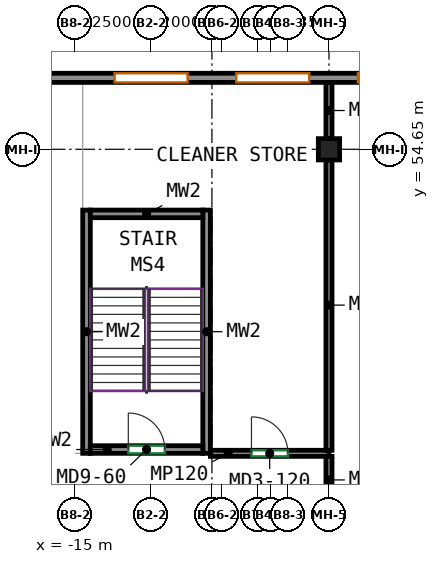
"""IFC4 building model, lengths in metres.
Left out: names, types, materials, properties, quantities, classifications, styles, units other than length and angle.
Written with IfcOpenShell. Run it as: python <this file> out.ifc"""

import sys

from ifc_helpers import new_model, si_unit, direction, frame, frame_2d, origin, origin_2d, place, context, subcontext, project, spatial, rectangle, extrude, source, transform, mapped, element, fill, save


model = new_model("IFC4")
c1 = context("Model", 3, precision=1e-05, world=origin(), true_north=direction((0.0, 1.0)))
c2 = subcontext(c1, "Body", "Model", "MODEL_VIEW")
j1 = project(units=[si_unit("LENGTHUNIT", "METRE"), si_unit("PLANEANGLEUNIT", "RADIAN")], contexts=[c1])
p1 = place(None, origin())
s1 = spatial("IfcSite", under=j1, at=p1, CompositionType="ELEMENT")
p2 = place(p1, origin())
s2 = spatial("IfcBuilding", under=s1, at=p2, CompositionType="ELEMENT")
p3 = place(p2, frame((0.0, 0.0, 18.0)))
s3 = spatial("IfcBuildingStorey", under=s2, at=p3, CompositionType="ELEMENT", Elevation=18.0)
m1 = source(origin(), c2, "Body", "SweptSolid", [
    extrude(rectangle(XDim=0.7, YDim=0.7, at=origin_2d()), origin(), (0.0, 0.0, 1.0), 4.1),
])
p4 = place(p3, frame((-6.65, 54.65, 0.0), z_axis=(0.0, 0.0, 1.0), x_axis=(1.0, 0.0, 0.0)))
e1 = element("IfcColumn", 1, at=p4, inside=s3, PredefinedType="COLUMN", context=c2, shape_type="MappedRepresentation", body=[
    mapped(m1, transform((0.0, 0.0, 0.0))),
])
m2 = source(origin(), c2, "Body", "SweptSolid", [
    extrude(rectangle(XDim=8.0, YDim=0.25, at=frame_2d((4.0, 0.0))), origin(), (0.0, 0.0, 1.0), 4.1),
])
for number, where, z_axis, x_axis in (
    (2, (-14.625, 44.65, 0.0), (0.0, 0.0, 1.0), (0.0, 1.0, 0.0)),
    (3, (-10.675, 44.65, 0.0), (0.0, 0.0, 1.0), (0.0, 1.0, 0.0)),
):
    element("IfcWall", number, at=place(p3, frame(where, z_axis=z_axis, x_axis=x_axis)), inside=s3, PredefinedType="SHEAR", context=c2, shape_type="MappedRepresentation", body=[
        mapped(m2, transform((0.0, 0.0, 0.0))),
    ])
m3 = source(origin(), c2, "Body", "SweptSolid", [
    extrude(rectangle(XDim=3.7, YDim=0.25, at=frame_2d((1.85, 0.0))), origin(), (0.0, 0.0, 1.0), 4.1),
])
p5 = place(p3, frame((-14.5, 44.775, 0.0), z_axis=(0.0, 0.0, 1.0), x_axis=(1.0, 0.0, 0.0)))
e4 = element("IfcWall", 4, at=p5, inside=s3, PredefinedType="SHEAR", context=c2, shape_type="MappedRepresentation", body=[
    mapped(m3, transform((0.0, 0.0, 0.0))),
])
p6 = place(p5, frame((1.25, 0.0, 0.0)))
e5 = element("IfcOpeningElement", 5, at=p6, cuts=e4, PredefinedType="OPENING", context=c2, shape_type="SweptSolid", body=[
    extrude(rectangle(XDim=1.2, YDim=2.1, at=frame_2d((0.6, 1.05))), frame((0.0, 0.135, 0.0), z_axis=(0.0, -1.0, 0.0), x_axis=(1.0, 0.0, 0.0)), (0.0, 0.0, 1.0), 0.27),
])
p7 = place(p3, frame((-14.5, 52.525, 0.0), z_axis=(0.0, 0.0, 1.0), x_axis=(1.0, 0.0, 0.0)))
e6 = element("IfcWall", 6, at=p7, inside=s3, PredefinedType="SHEAR", context=c2, shape_type="MappedRepresentation", body=[
    mapped(m3, transform((0.0, 0.0, 0.0))),
])
m4 = source(origin(), c2, "Body", "SweptSolid", [
    extrude(rectangle(XDim=112.7, YDim=0.3, at=frame_2d((56.35, 0.0))), origin(), (0.0, 0.0, 1.0), 4.1),
])
p8 = place(p3, frame((-56.85, 57.0, 0.0), z_axis=(0.0, 0.0, 1.0), x_axis=(1.0, 0.0, 0.0)))
e7 = element("IfcWall", 7, at=p8, inside=s3, PredefinedType="SOLIDWALL", context=c2, shape_type="MappedRepresentation", body=[
    mapped(m4, transform((0.0, 0.0, 0.0))),
])
p9 = place(p8, frame((3.15, 0.0, 0.9)))
e8 = element("IfcOpeningElement", 8, at=p9, cuts=e7, PredefinedType="OPENING", context=c2, shape_type="SweptSolid", body=[
    extrude(rectangle(XDim=2.4, YDim=1.8, at=frame_2d((1.2, 0.9))), frame((0.0, 0.16, 0.0), z_axis=(0.0, -1.0, 0.0), x_axis=(1.0, 0.0, 0.0)), (0.0, 0.0, 1.0), 0.32),
])
p10 = place(p8, frame((7.15, 0.0, 0.9)))
e9 = element("IfcOpeningElement", 9, at=p10, cuts=e7, PredefinedType="OPENING", context=c2, shape_type="SweptSolid", body=[
    extrude(rectangle(XDim=2.4, YDim=1.8, at=frame_2d((1.2, 0.9))), frame((0.0, 0.16, 0.0), z_axis=(0.0, -1.0, 0.0), x_axis=(1.0, 0.0, 0.0)), (0.0, 0.0, 1.0), 0.32),
])
p11 = place(p8, frame((11.15, 0.0, 0.9)))
e10 = element("IfcOpeningElement", 10, at=p11, cuts=e7, PredefinedType="OPENING", context=c2, shape_type="SweptSolid", body=[
    extrude(rectangle(XDim=2.4, YDim=1.8, at=frame_2d((1.2, 0.9))), frame((0.0, 0.16, 0.0), z_axis=(0.0, -1.0, 0.0), x_axis=(1.0, 0.0, 0.0)), (0.0, 0.0, 1.0), 0.32),
])
p12 = place(p8, frame((15.15, 0.0, 0.9)))
e11 = element("IfcOpeningElement", 11, at=p12, cuts=e7, PredefinedType="OPENING", context=c2, shape_type="SweptSolid", body=[
    extrude(rectangle(XDim=2.4, YDim=1.8, at=frame_2d((1.2, 0.9))), frame((0.0, 0.16, 0.0), z_axis=(0.0, -1.0, 0.0), x_axis=(1.0, 0.0, 0.0)), (0.0, 0.0, 1.0), 0.32),
])
p13 = place(p8, frame((19.15, 0.0, 0.9)))
e12 = element("IfcOpeningElement", 12, at=p13, cuts=e7, PredefinedType="OPENING", context=c2, shape_type="SweptSolid", body=[
    extrude(rectangle(XDim=2.4, YDim=1.8, at=frame_2d((1.2, 0.9))), frame((0.0, 0.16, 0.0), z_axis=(0.0, -1.0, 0.0), x_axis=(1.0, 0.0, 0.0)), (0.0, 0.0, 1.0), 0.32),
])
p14 = place(p8, frame((23.15, 0.0, 0.9)))
e13 = element("IfcOpeningElement", 13, at=p14, cuts=e7, PredefinedType="OPENING", context=c2, shape_type="SweptSolid", body=[
    extrude(rectangle(XDim=2.4, YDim=1.8, at=frame_2d((1.2, 0.9))), frame((0.0, 0.16, 0.0), z_axis=(0.0, -1.0, 0.0), x_axis=(1.0, 0.0, 0.0)), (0.0, 0.0, 1.0), 0.32),
])
p15 = place(p8, frame((27.15, 0.0, 0.9)))
e14 = element("IfcOpeningElement", 14, at=p15, cuts=e7, PredefinedType="OPENING", context=c2, shape_type="SweptSolid", body=[
    extrude(rectangle(XDim=2.4, YDim=1.8, at=frame_2d((1.2, 0.9))), frame((0.0, 0.16, 0.0), z_axis=(0.0, -1.0, 0.0), x_axis=(1.0, 0.0, 0.0)), (0.0, 0.0, 1.0), 0.32),
])
p16 = place(p8, frame((31.15, 0.0, 0.9)))
e15 = element("IfcOpeningElement", 15, at=p16, cuts=e7, PredefinedType="OPENING", context=c2, shape_type="SweptSolid", body=[
    extrude(rectangle(XDim=2.4, YDim=1.8, at=frame_2d((1.2, 0.9))), frame((0.0, 0.16, 0.0), z_axis=(0.0, -1.0, 0.0), x_axis=(1.0, 0.0, 0.0)), (0.0, 0.0, 1.0), 0.32),
])
p17 = place(p8, frame((35.15, 0.0, 0.9)))
e16 = element("IfcOpeningElement", 16, at=p17, cuts=e7, PredefinedType="OPENING", context=c2, shape_type="SweptSolid", body=[
    extrude(rectangle(XDim=2.4, YDim=1.8, at=frame_2d((1.2, 0.9))), frame((0.0, 0.16, 0.0), z_axis=(0.0, -1.0, 0.0), x_axis=(1.0, 0.0, 0.0)), (0.0, 0.0, 1.0), 0.32),
])
p18 = place(p8, frame((43.15, 0.0, 0.9)))
e17 = element("IfcOpeningElement", 17, at=p18, cuts=e7, PredefinedType="OPENING", context=c2, shape_type="SweptSolid", body=[
    extrude(rectangle(XDim=2.4, YDim=1.8, at=frame_2d((1.2, 0.9))), frame((0.0, 0.16, 0.0), z_axis=(0.0, -1.0, 0.0), x_axis=(1.0, 0.0, 0.0)), (0.0, 0.0, 1.0), 0.32),
])
p19 = place(p8, frame((47.15, 0.0, 0.9)))
e18 = element("IfcOpeningElement", 18, at=p19, cuts=e7, PredefinedType="OPENING", context=c2, shape_type="SweptSolid", body=[
    extrude(rectangle(XDim=2.4, YDim=1.8, at=frame_2d((1.2, 0.9))), frame((0.0, 0.16, 0.0), z_axis=(0.0, -1.0, 0.0), x_axis=(1.0, 0.0, 0.0)), (0.0, 0.0, 1.0), 0.32),
])
p20 = place(p8, frame((51.15, 0.0, 0.9)))
e19 = element("IfcOpeningElement", 19, at=p20, cuts=e7, PredefinedType="OPENING", context=c2, shape_type="SweptSolid", body=[
    extrude(rectangle(XDim=2.4, YDim=1.8, at=frame_2d((1.2, 0.9))), frame((0.0, 0.16, 0.0), z_axis=(0.0, -1.0, 0.0), x_axis=(1.0, 0.0, 0.0)), (0.0, 0.0, 1.0), 0.32),
])
p21 = place(p8, frame((55.15, 0.0, 0.9)))
e20 = element("IfcOpeningElement", 20, at=p21, cuts=e7, PredefinedType="OPENING", context=c2, shape_type="SweptSolid", body=[
    extrude(rectangle(XDim=2.4, YDim=1.8, at=frame_2d((1.2, 0.9))), frame((0.0, 0.16, 0.0), z_axis=(0.0, -1.0, 0.0), x_axis=(1.0, 0.0, 0.0)), (0.0, 0.0, 1.0), 0.32),
])
p22 = place(p8, frame((59.15, 0.0, 0.9)))
e21 = element("IfcOpeningElement", 21, at=p22, cuts=e7, PredefinedType="OPENING", context=c2, shape_type="SweptSolid", body=[
    extrude(rectangle(XDim=2.4, YDim=1.8, at=frame_2d((1.2, 0.9))), frame((0.0, 0.16, 0.0), z_axis=(0.0, -1.0, 0.0), x_axis=(1.0, 0.0, 0.0)), (0.0, 0.0, 1.0), 0.32),
])
p23 = place(p8, frame((63.15, 0.0, 0.9)))
e22 = element("IfcOpeningElement", 22, at=p23, cuts=e7, PredefinedType="OPENING", context=c2, shape_type="SweptSolid", body=[
    extrude(rectangle(XDim=2.4, YDim=1.8, at=frame_2d((1.2, 0.9))), frame((0.0, 0.16, 0.0), z_axis=(0.0, -1.0, 0.0), x_axis=(1.0, 0.0, 0.0)), (0.0, 0.0, 1.0), 0.32),
])
p24 = place(p8, frame((67.15, 0.0, 0.9)))
e23 = element("IfcOpeningElement", 23, at=p24, cuts=e7, PredefinedType="OPENING", context=c2, shape_type="SweptSolid", body=[
    extrude(rectangle(XDim=2.4, YDim=1.8, at=frame_2d((1.2, 0.9))), frame((0.0, 0.16, 0.0), z_axis=(0.0, -1.0, 0.0), x_axis=(1.0, 0.0, 0.0)), (0.0, 0.0, 1.0), 0.32),
])
p25 = place(p8, frame((71.15, 0.0, 0.9)))
e24 = element("IfcOpeningElement", 24, at=p25, cuts=e7, PredefinedType="OPENING", context=c2, shape_type="SweptSolid", body=[
    extrude(rectangle(XDim=2.4, YDim=1.8, at=frame_2d((1.2, 0.9))), frame((0.0, 0.16, 0.0), z_axis=(0.0, -1.0, 0.0), x_axis=(1.0, 0.0, 0.0)), (0.0, 0.0, 1.0), 0.32),
])
p26 = place(p8, frame((75.15, 0.0, 0.9)))
e25 = element("IfcOpeningElement", 25, at=p26, cuts=e7, PredefinedType="OPENING", context=c2, shape_type="SweptSolid", body=[
    extrude(rectangle(XDim=2.4, YDim=1.8, at=frame_2d((1.2, 0.9))), frame((0.0, 0.16, 0.0), z_axis=(0.0, -1.0, 0.0), x_axis=(1.0, 0.0, 0.0)), (0.0, 0.0, 1.0), 0.32),
])
p27 = place(p8, frame((79.15, 0.0, 0.9)))
e26 = element("IfcOpeningElement", 26, at=p27, cuts=e7, PredefinedType="OPENING", context=c2, shape_type="SweptSolid", body=[
    extrude(rectangle(XDim=2.4, YDim=1.8, at=frame_2d((1.2, 0.9))), frame((0.0, 0.16, 0.0), z_axis=(0.0, -1.0, 0.0), x_axis=(1.0, 0.0, 0.0)), (0.0, 0.0, 1.0), 0.32),
])
p28 = place(p8, frame((83.15, 0.0, 0.9)))
e27 = element("IfcOpeningElement", 27, at=p28, cuts=e7, PredefinedType="OPENING", context=c2, shape_type="SweptSolid", body=[
    extrude(rectangle(XDim=2.4, YDim=1.8, at=frame_2d((1.2, 0.9))), frame((0.0, 0.16, 0.0), z_axis=(0.0, -1.0, 0.0), x_axis=(1.0, 0.0, 0.0)), (0.0, 0.0, 1.0), 0.32),
])
p29 = place(p8, frame((87.15, 0.0, 0.9)))
e28 = element("IfcOpeningElement", 28, at=p29, cuts=e7, PredefinedType="OPENING", context=c2, shape_type="SweptSolid", body=[
    extrude(rectangle(XDim=2.4, YDim=1.8, at=frame_2d((1.2, 0.9))), frame((0.0, 0.16, 0.0), z_axis=(0.0, -1.0, 0.0), x_axis=(1.0, 0.0, 0.0)), (0.0, 0.0, 1.0), 0.32),
])
p30 = place(p8, frame((91.15, 0.0, 0.9)))
e29 = element("IfcOpeningElement", 29, at=p30, cuts=e7, PredefinedType="OPENING", context=c2, shape_type="SweptSolid", body=[
    extrude(rectangle(XDim=2.4, YDim=1.8, at=frame_2d((1.2, 0.9))), frame((0.0, 0.16, 0.0), z_axis=(0.0, -1.0, 0.0), x_axis=(1.0, 0.0, 0.0)), (0.0, 0.0, 1.0), 0.32),
])
p31 = place(p8, frame((95.15, 0.0, 0.9)))
e30 = element("IfcOpeningElement", 30, at=p31, cuts=e7, PredefinedType="OPENING", context=c2, shape_type="SweptSolid", body=[
    extrude(rectangle(XDim=2.4, YDim=1.8, at=frame_2d((1.2, 0.9))), frame((0.0, 0.16, 0.0), z_axis=(0.0, -1.0, 0.0), x_axis=(1.0, 0.0, 0.0)), (0.0, 0.0, 1.0), 0.32),
])
p32 = place(p8, frame((103.15, 0.0, 0.9)))
e31 = element("IfcOpeningElement", 31, at=p32, cuts=e7, PredefinedType="OPENING", context=c2, shape_type="SweptSolid", body=[
    extrude(rectangle(XDim=2.4, YDim=1.8, at=frame_2d((1.2, 0.9))), frame((0.0, 0.16, 0.0), z_axis=(0.0, -1.0, 0.0), x_axis=(1.0, 0.0, 0.0)), (0.0, 0.0, 1.0), 0.32),
])
p33 = place(p8, frame((107.15, 0.0, 0.9)))
e32 = element("IfcOpeningElement", 32, at=p33, cuts=e7, PredefinedType="OPENING", context=c2, shape_type="SweptSolid", body=[
    extrude(rectangle(XDim=2.4, YDim=1.8, at=frame_2d((1.2, 0.9))), frame((0.0, 0.16, 0.0), z_axis=(0.0, -1.0, 0.0), x_axis=(1.0, 0.0, 0.0)), (0.0, 0.0, 1.0), 0.32),
])
m5 = source(origin(), c2, "Body", "SweptSolid", [
    extrude(rectangle(XDim=3.9, YDim=0.2, at=frame_2d((1.95, 0.0))), origin(), (0.0, 0.0, 1.0), 3.3),
])
p34 = place(p3, frame((-10.55, 44.65, 0.0), z_axis=(0.0, 0.0, 1.0), x_axis=(1.0, 0.0, 0.0)))
e33 = element("IfcWall", 33, at=p34, inside=s3, PredefinedType="PARTITIONING", context=c2, shape_type="MappedRepresentation", body=[
    mapped(m5, transform((0.0, 0.0, 0.0))),
])
p35 = place(p34, frame((1.35, 0.0, 0.0)))
e34 = element("IfcOpeningElement", 34, at=p35, cuts=e33, PredefinedType="OPENING", context=c2, shape_type="SweptSolid", body=[
    extrude(rectangle(XDim=1.2, YDim=2.1, at=frame_2d((0.6, 1.05))), frame((0.0, 0.11, 0.0), z_axis=(0.0, -1.0, 0.0), x_axis=(1.0, 0.0, 0.0)), (0.0, 0.0, 1.0), 0.22),
])
m6 = source(origin(), c2, "Body", "SweptSolid", [
    extrude(rectangle(XDim=1.55, YDim=0.2, at=frame_2d((0.775, 0.0))), origin(), (0.0, 0.0, 1.0), 3.3),
])
p36 = place(p3, frame((-6.65, 44.55, 0.0), z_axis=(0.0, 0.0, 1.0), x_axis=(0.0, -1.0, 0.0)))
e35 = element("IfcWall", 35, at=p36, inside=s3, PredefinedType="PARTITIONING", context=c2, shape_type="MappedRepresentation", body=[
    mapped(m6, transform((0.0, 0.0, 0.0))),
])
m7 = source(origin(), c2, "Body", "SweptSolid", [
    extrude(rectangle(XDim=9.55, YDim=0.2, at=frame_2d((4.775, 0.0))), origin(), (0.0, 0.0, 1.0), 3.3),
])
p37 = place(p3, frame((-6.65, 54.3, 0.0), z_axis=(0.0, 0.0, 1.0), x_axis=(0.0, -1.0, 0.0)))
e36 = element("IfcWall", 36, at=p37, inside=s3, PredefinedType="PARTITIONING", context=c2, shape_type="MappedRepresentation", body=[
    mapped(m7, transform((0.0, 0.0, 0.0))),
])
m8 = source(origin(), c2, "Body", "SweptSolid", [
    extrude(rectangle(XDim=1.85, YDim=0.2, at=frame_2d((0.925, 0.0))), origin(), (0.0, 0.0, 1.0), 4.1),
])
p38 = place(p3, frame((-6.65, 56.85, 0.0), z_axis=(0.0, 0.0, 1.0), x_axis=(0.0, -1.0, 0.0)))
e37 = element("IfcWall", 37, at=p38, inside=s3, PredefinedType="PARTITIONING", context=c2, shape_type="MappedRepresentation", body=[
    mapped(m8, transform((0.0, 0.0, 0.0))),
])
p39 = place(p18, origin())
e38 = element("IfcWindow", 38, at=p39, inside=s3, PartitioningType="SINGLE_PANEL", PredefinedType="WINDOW", context=c2, shape_type="SweptSolid", body=[
    extrude(rectangle(XDim=2.4, YDim=1.8, at=frame_2d((1.2, 0.9))), frame((0.0, 0.03, 0.0), z_axis=(0.0, -1.0, 0.0), x_axis=(1.0, 0.0, 0.0)), (0.0, 0.0, 1.0), 0.06),
])
fill(e17, e38)
p40 = place(p19, origin())
e39 = element("IfcWindow", 39, at=p40, inside=s3, PartitioningType="SINGLE_PANEL", PredefinedType="WINDOW", context=c2, shape_type="SweptSolid", body=[
    extrude(rectangle(XDim=2.4, YDim=1.8, at=frame_2d((1.2, 0.9))), frame((0.0, 0.03, 0.0), z_axis=(0.0, -1.0, 0.0), x_axis=(1.0, 0.0, 0.0)), (0.0, 0.0, 1.0), 0.06),
])
fill(e18, e39)
p41 = place(p20, origin())
e40 = element("IfcWindow", 40, at=p41, inside=s3, PartitioningType="SINGLE_PANEL", PredefinedType="WINDOW", context=c2, shape_type="SweptSolid", body=[
    extrude(rectangle(XDim=2.4, YDim=1.8, at=frame_2d((1.2, 0.9))), frame((0.0, 0.03, 0.0), z_axis=(0.0, -1.0, 0.0), x_axis=(1.0, 0.0, 0.0)), (0.0, 0.0, 1.0), 0.06),
])
fill(e19, e40)
p42 = place(p6, origin())
e41 = element("IfcDoor", 41, at=p42, inside=s3, OperationType="DOUBLE_DOOR_SINGLE_SWING", PredefinedType="DOOR", context=c2, shape_type="SweptSolid", body=[
    extrude(rectangle(XDim=1.2, YDim=2.1, at=frame_2d((0.6, 1.05))), frame((0.0, 0.025, 0.0), z_axis=(0.0, -1.0, 0.0), x_axis=(1.0, 0.0, 0.0)), (0.0, 0.0, 1.0), 0.05),
])
fill(e5, e41)
p43 = place(p35, origin())
e42 = element("IfcDoor", 42, at=p43, inside=s3, OperationType="SINGLE_SWING_LEFT", PredefinedType="DOOR", context=c2, shape_type="SweptSolid", body=[
    extrude(rectangle(XDim=1.2, YDim=2.1, at=frame_2d((0.6, 1.05))), frame((0.0, 0.025, 0.0), z_axis=(0.0, -1.0, 0.0), x_axis=(1.0, 0.0, 0.0)), (0.0, 0.0, 1.0), 0.05),
])
fill(e34, e42)
save(model, sys.argv[1])
